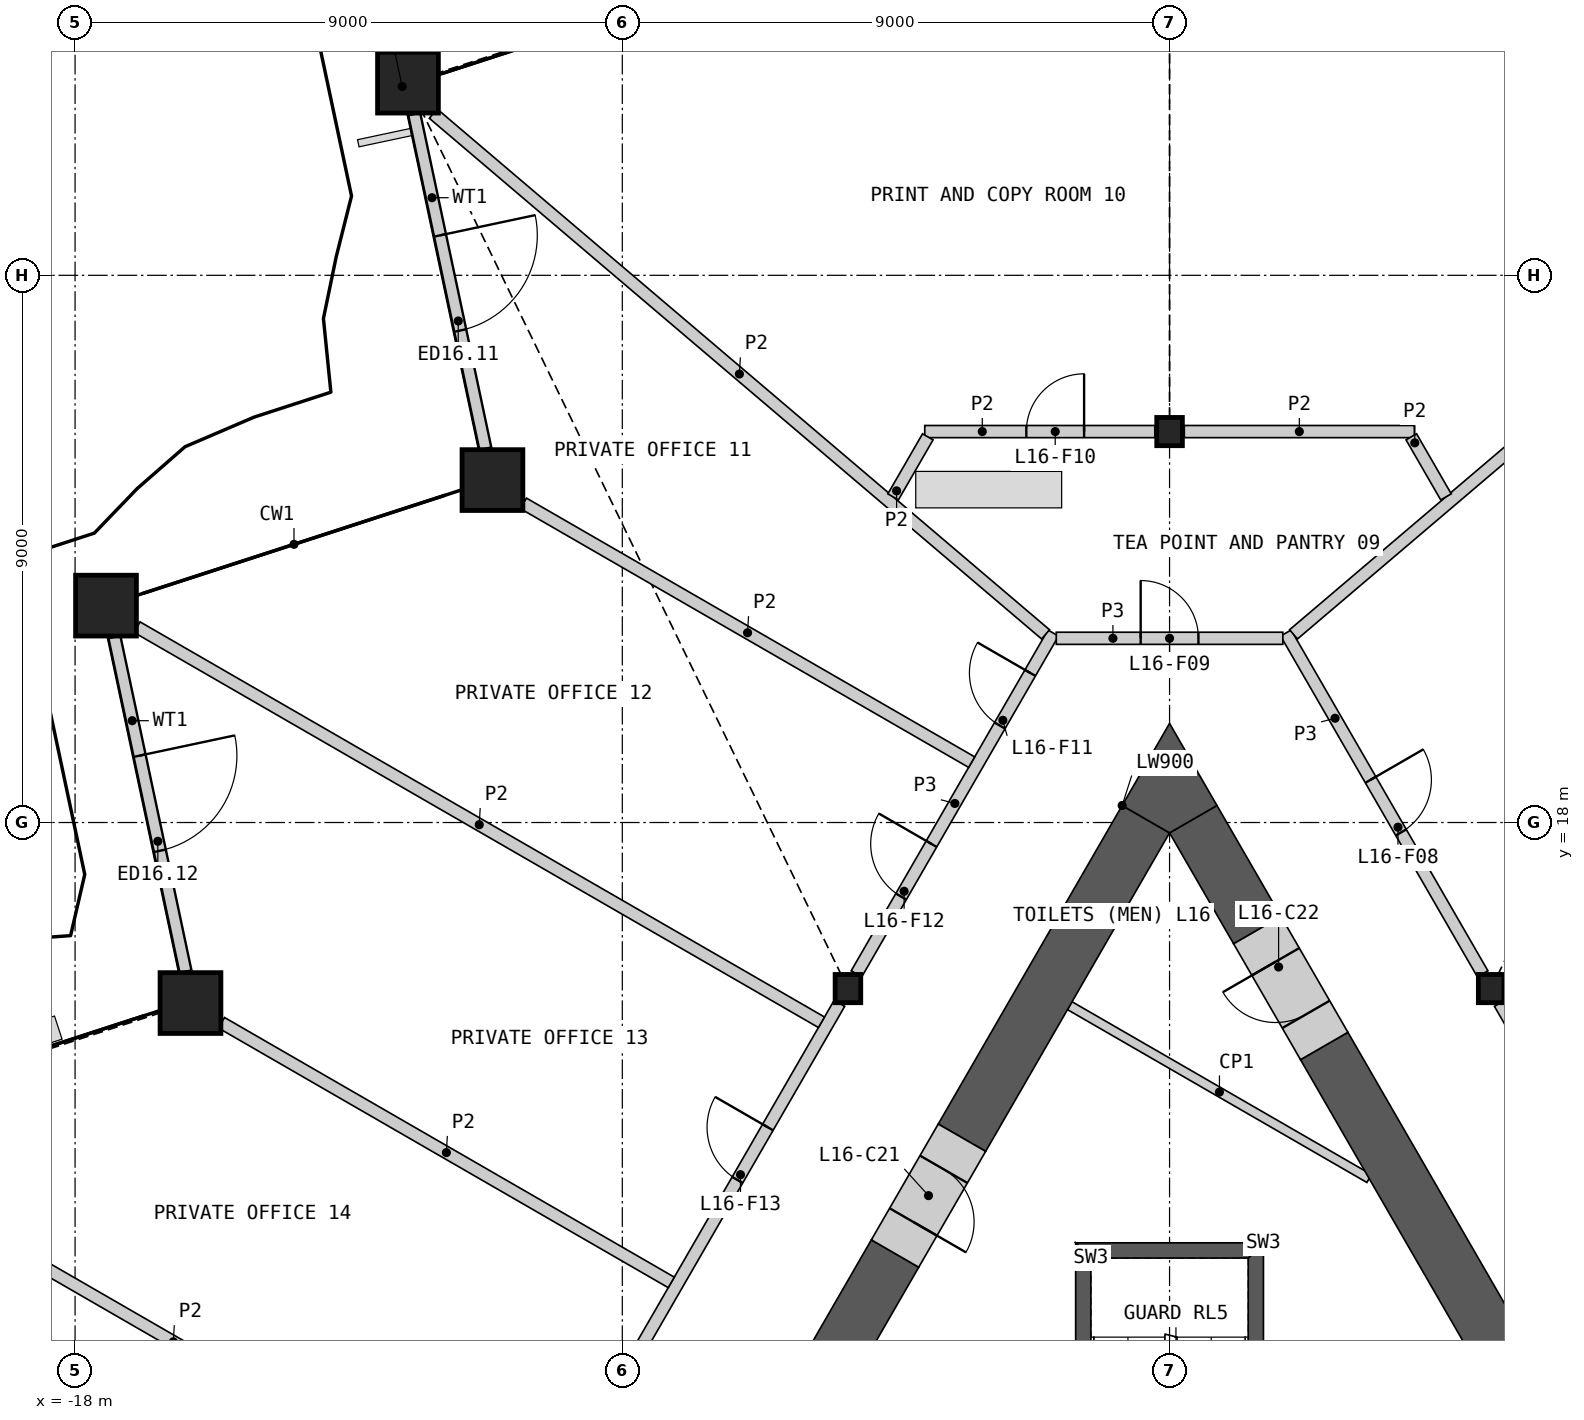
"""IFC4 building model, lengths in metres.
Left out: names, types, materials, properties, quantities, classifications, styles, units other than length and angle.
Written with IfcOpenShell. Run it as: python <this file> out.ifc"""

import sys

from ifc_helpers import new_model, si_unit, direction, frame, frame_2d, origin, origin_2d, place, context, subcontext, project, spatial, polyline, rectangle, hollow_rectangle, i_section, outline, extrude, element, fill, save


model = new_model("IFC4")
c1 = context("Model", 3, precision=1e-05, world=origin(), true_north=direction((0.0, 1.0)))
c2 = subcontext(c1, "Body", "Model", "MODEL_VIEW")
j1 = project(units=[si_unit("LENGTHUNIT", "METRE"), si_unit("PLANEANGLEUNIT", "RADIAN")], contexts=[c1])
p1 = place(None, origin())
s1 = spatial("IfcSite", under=j1, at=p1, CompositionType="ELEMENT")
p2 = place(p1, origin())
s2 = spatial("IfcBuilding", under=s1, at=p2, CompositionType="ELEMENT")
p3 = place(p2, frame((0.0, 0.0, 76.2)))
s3 = spatial("IfcBuildingStorey", under=s2, at=p3, CompositionType="ELEMENT", Elevation=76.2)
for number, where, z_axis, x_axis in (
    (1, (-12.525, 30.169, 0.0), (0.0, 0.0, 1.0), (1.0, 0.0, 0.0)),
    (2, (-11.136, 23.632, 0.0), (0.0, 0.0, 1.0), (1.0, 0.0, 0.0)),
    (3, (-17.491, 21.567, 0.0), (0.0, 0.0, 1.0), (1.0, 0.0, 0.0)),
    (4, (-16.102, 15.031, 0.0), (0.0, 0.0, 1.0), (1.0, 0.0, 0.0)),
):
    element("IfcColumn", number, at=place(p3, frame(where, z_axis=z_axis, x_axis=x_axis)), inside=s3, PredefinedType="COLUMN", context=c2, shape_type="SweptSolid", body=[
        extrude(hollow_rectangle(XDim=1.0, YDim=1.0, WallThickness=0.07, at=origin_2d()), origin(), (0.0, 0.0, 1.0), 4.2),
    ])
for number, where, z_axis, x_axis in (
    (5, (0.0, 24.43, 0.0), (0.0, 0.0, 1.0), (1.0, 0.0, 0.0)),
    (6, (-5.289, 15.269, 0.0), (0.0, 0.0, 1.0), (1.0, 0.0, 0.0)),
    (7, (5.289, 15.269, 0.0), (0.0, 0.0, 1.0), (1.0, 0.0, 0.0)),
):
    element("IfcColumn", number, at=place(p3, frame(where, z_axis=z_axis, x_axis=x_axis)), inside=s3, PredefinedType="COLUMN", context=c2, shape_type="SweptSolid", body=[
        extrude(i_section(OverallWidth=0.421, OverallDepth=0.465, WebThickness=0.045, FlangeThickness=0.072, at=origin_2d()), origin(), (0.0, 0.0, 1.0), 4.2),
    ])
p4 = place(p3, frame((-12.422, 29.652, 0.0), z_axis=(0.0, 0.0, 1.0), x_axis=(0.207901831982, -0.978149696242, 0.0)))
e8 = element("IfcWall", 8, at=p4, inside=s3, PredefinedType="SOLIDWALL", context=c2, shape_type="SweptSolid", body=[
    extrude(rectangle(XDim=5.626, YDim=0.2, at=frame_2d((2.813, 0.0))), origin(), (0.0, 0.0, 1.0), 3.189),
])
p5 = place(p4, frame((2.039, 0.0, 0.0)))
e9 = element("IfcOpeningElement", 9, at=p5, cuts=e8, PredefinedType="OPENING", context=c2, shape_type="SweptSolid", body=[
    extrude(rectangle(XDim=1.6, YDim=2.4, at=frame_2d((0.8, 1.2))), frame((0.0, 0.11, 0.0), z_axis=(0.0, -1.0, 0.0), x_axis=(1.0, 0.0, 0.0)), (0.0, 0.0, 1.0), 0.22),
])
p6 = place(p3, frame((-17.353, 21.051, 0.0), z_axis=(0.0, 0.0, 1.0), x_axis=(0.207901831982, -0.978149696242, 0.0)))
e10 = element("IfcWall", 10, at=p6, inside=s3, PredefinedType="SOLIDWALL", context=c2, shape_type="SweptSolid", body=[
    extrude(rectangle(XDim=5.626, YDim=0.2, at=frame_2d((2.813, 0.0))), origin(), (0.0, 0.0, 1.0), 3.189),
])
p7 = place(p6, frame((1.994, 0.0, 0.0)))
e11 = element("IfcOpeningElement", 11, at=p7, cuts=e10, PredefinedType="OPENING", context=c2, shape_type="SweptSolid", body=[
    extrude(rectangle(XDim=1.6, YDim=2.4, at=frame_2d((0.8, 1.2))), frame((0.0, 0.11, 0.0), z_axis=(0.0, -1.0, 0.0), x_axis=(1.0, 0.0, 0.0)), (0.0, 0.0, 1.0), 0.22),
])
p8 = place(p3, origin())
e12 = element("IfcWall", 12, at=p8, inside=s3, PredefinedType="SHEAR", context=c2, shape_type="SweptSolid", body=[
    extrude(outline(polyline([(1.544, 5.237), (1.544, 11.087), (1.294, 10.837), (1.294, 5.237), (1.544, 5.237)])), origin(), (0.0, 0.0, 1.0), 3.8),
])
p9 = place(p3, origin())
e13 = element("IfcWall", 13, at=p9, inside=s3, PredefinedType="SHEAR", context=c2, shape_type="SweptSolid", body=[
    extrude(outline(polyline([(1.544, 11.087), (-1.544, 11.087), (-1.294, 10.837), (1.294, 10.837), (1.544, 11.087)])), origin(), (0.0, 0.0, 1.0), 3.8),
])
p10 = place(p3, origin())
e14 = element("IfcWall", 14, at=p10, inside=s3, PredefinedType="SHEAR", context=c2, shape_type="SweptSolid", body=[
    extrude(outline(polyline([(-1.294, 10.837), (-1.544, 11.087), (-1.544, 5.237), (-1.294, 5.237), (-1.294, 10.837)])), origin(), (0.0, 0.0, 1.0), 3.8),
])
p11 = place(p3, frame((-1.641, 14.987, 0.0), z_axis=(0.0, 0.0, 1.0), x_axis=(0.866033267067, -0.499986380149, 0.0)))
e15 = element("IfcWall", 15, at=p11, inside=s3, PredefinedType="PARTITIONING", context=c2, shape_type="SweptSolid", body=[
    extrude(rectangle(XDim=5.685, YDim=0.15, at=frame_2d((2.843, 0.0))), origin(), (0.0, 0.0, 1.0), 3.8),
])
p12 = place(p3, frame((7.646, 5.486, 0.0), z_axis=(0.0, 0.0, 1.0), x_axis=(-0.499982660725, 0.866035414388, 0.0)))
e16 = element("IfcWall", 16, at=p12, inside=s3, PredefinedType="SHEAR", context=c2, shape_type="SweptSolid", body=[
    extrude(rectangle(XDim=10.206, YDim=0.9, at=frame_2d((5.103, 0.0))), origin(), (0.0, 0.0, 1.0), 3.8),
])
p13 = place(p3, frame((1.443, 16.23, 0.0), z_axis=(0.0, 0.0, 1.0), x_axis=(-0.500026652407, 0.866010015463, 0.0)))
e17 = element("IfcWall", 17, at=p13, inside=s3, PredefinedType="SHEAR", context=c2, shape_type="SweptSolid", body=[
    extrude(rectangle(XDim=2.107, YDim=0.9, at=frame_2d((1.054, 0.0))), origin(), (0.0, 0.0, 1.0), 3.8),
])
p14 = place(p3, frame((-4.514, 10.911, 0.0), z_axis=(0.0, 0.0, 1.0), x_axis=(-0.500006662879, -0.866021556935, 0.0)))
e18 = element("IfcWall", 18, at=p14, inside=s3, PredefinedType="SHEAR", context=c2, shape_type="SweptSolid", body=[
    extrude(rectangle(XDim=7.312, YDim=0.9, at=frame_2d((3.656, 0.0))), origin(), (0.0, 0.0, 1.0), 3.8),
])
p15 = place(p3, frame((-0.39, 18.055, 0.0), z_axis=(0.0, 0.0, 1.0), x_axis=(-0.500006596359, -0.866021595341, 0.0)))
e19 = element("IfcWall", 19, at=p15, inside=s3, PredefinedType="SHEAR", context=c2, shape_type="SweptSolid", body=[
    extrude(rectangle(XDim=6.049, YDim=0.9, at=frame_2d((3.025, 0.0))), origin(), (0.0, 0.0, 1.0), 3.8),
])
p16 = place(p3, origin())
e20 = element("IfcWall", 20, at=p16, inside=s3, PredefinedType="SHEAR", context=c2, shape_type="SweptSolid", body=[
    extrude(outline(polyline([(-0.779, 18.28), (0.0, 19.63), (0.779, 18.28), (0.0, 17.83), (-0.779, 18.28)])), origin(), (0.0, 0.0, 1.0), 3.8),
])
p17 = place(p3, frame((-3.414, 12.816, 0.0), z_axis=(0.0, 0.0, 1.0), x_axis=(-0.50002983664, -0.866008176907, 0.0)))
e21 = element("IfcWall", 21, at=p17, inside=s3, PredefinedType="SHEAR", context=c2, shape_type="SweptSolid", body=[
    extrude(rectangle(XDim=2.2, YDim=0.9, at=frame_2d((1.1, 0.0))), origin(), (0.0, 0.0, 1.0), 3.8),
])
p18 = place(p17, frame((0.6, 0.0, 0.0)))
e22 = element("IfcOpeningElement", 22, at=p18, cuts=e21, PredefinedType="OPENING", context=c2, shape_type="SweptSolid", body=[
    extrude(rectangle(XDim=1.0, YDim=2.1, at=frame_2d((0.5, 1.05))), frame((0.0, 0.46, 0.0), z_axis=(0.0, -1.0, 0.0), x_axis=(1.0, 0.0, 0.0)), (0.0, 0.0, 1.0), 0.92),
])
p19 = place(p3, frame((2.543, 14.325, 0.0), z_axis=(0.0, 0.0, 1.0), x_axis=(-0.50002983664, 0.866008176907, 0.0)))
e23 = element("IfcWall", 23, at=p19, inside=s3, PredefinedType="SHEAR", context=c2, shape_type="SweptSolid", body=[
    extrude(rectangle(XDim=2.2, YDim=0.9, at=frame_2d((1.1, 0.0))), origin(), (0.0, 0.0, 1.0), 3.8),
])
p20 = place(p19, frame((0.6, 0.0, 0.0)))
e24 = element("IfcOpeningElement", 24, at=p20, cuts=e23, PredefinedType="OPENING", context=c2, shape_type="SweptSolid", body=[
    extrude(rectangle(XDim=1.0, YDim=2.1, at=frame_2d((0.5, 1.05))), frame((0.0, 0.46, 0.0), z_axis=(0.0, -1.0, 0.0), x_axis=(1.0, 0.0, 0.0)), (0.0, 0.0, 1.0), 0.92),
])
p21 = place(p3, frame((5.429, 15.026, 0.0), z_axis=(0.0, 0.0, 1.0), x_axis=(0.50001002959, -0.86601961312, 0.0)))
e25 = element("IfcWall", 25, at=p21, inside=s3, PredefinedType="PARTITIONING", context=c2, shape_type="SweptSolid", body=[
    extrude(rectangle(XDim=10.019, YDim=0.2, at=frame_2d((5.009, 0.0))), origin(), (0.0, 0.0, 1.0), 3.8),
])
p22 = place(p21, frame((4.76, 0.0, 0.0)))
e26 = element("IfcOpeningElement", 26, at=p22, cuts=e25, PredefinedType="OPENING", context=c2, shape_type="SweptSolid", body=[
    extrude(rectangle(XDim=1.0, YDim=2.1, at=frame_2d((0.5, 1.05))), frame((0.0, 0.11, 0.0), z_axis=(0.0, -1.0, 0.0), x_axis=(1.0, 0.0, 0.0)), (0.0, 0.0, 1.0), 0.22),
])
p23 = place(p3, frame((-10.439, 6.35, 0.0), z_axis=(0.0, 0.0, 1.0), x_axis=(0.50001002959, 0.86601961312, 0.0)))
e27 = element("IfcWall", 27, at=p23, inside=s3, PredefinedType="PARTITIONING", context=c2, shape_type="SweptSolid", body=[
    extrude(rectangle(XDim=10.019, YDim=0.2, at=frame_2d((5.009, 0.0))), origin(), (0.0, 0.0, 1.0), 3.8),
])
p24 = place(p23, frame((6.664, 0.0, 0.0)))
e28 = element("IfcOpeningElement", 28, at=p24, cuts=e27, PredefinedType="OPENING", context=c2, shape_type="SweptSolid", body=[
    extrude(rectangle(XDim=1.0, YDim=2.1, at=frame_2d((0.5, 1.05))), frame((0.0, 0.11, 0.0), z_axis=(0.0, -1.0, 0.0), x_axis=(1.0, 0.0, 0.0)), (0.0, 0.0, 1.0), 0.22),
])
p25 = place(p23, frame((1.854, 0.0, 0.0)))
e29 = element("IfcOpeningElement", 29, at=p25, cuts=e27, PredefinedType="OPENING", context=c2, shape_type="SweptSolid", body=[
    extrude(rectangle(XDim=1.0, YDim=2.1, at=frame_2d((0.5, 1.05))), frame((0.0, 0.11, 0.0), z_axis=(0.0, -1.0, 0.0), x_axis=(1.0, 0.0, 0.0)), (0.0, 0.0, 1.0), 0.22),
])
p26 = place(p3, frame((1.913, 21.116, 0.0), z_axis=(0.0, 0.0, 1.0), x_axis=(0.500001069878, -0.866024786089, 0.0)))
e30 = element("IfcWall", 30, at=p26, inside=s3, PredefinedType="PARTITIONING", context=c2, shape_type="SweptSolid", body=[
    extrude(rectangle(XDim=6.473, YDim=0.2, at=frame_2d((3.236, 0.0))), origin(), (0.0, 0.0, 1.0), 3.8),
])
p27 = place(p26, frame((2.787, 0.0, 0.0)))
e31 = element("IfcOpeningElement", 31, at=p27, cuts=e30, PredefinedType="OPENING", context=c2, shape_type="SweptSolid", body=[
    extrude(rectangle(XDim=1.0, YDim=2.1, at=frame_2d((0.5, 1.05))), frame((0.0, 0.11, 0.0), z_axis=(0.0, -1.0, 0.0), x_axis=(1.0, 0.0, 0.0)), (0.0, 0.0, 1.0), 0.22),
])
p28 = place(p3, frame((-5.149, 15.511, 0.0), z_axis=(0.0, 0.0, 1.0), x_axis=(0.500001069878, 0.866024786089, 0.0)))
e32 = element("IfcWall", 32, at=p28, inside=s3, PredefinedType="PARTITIONING", context=c2, shape_type="SweptSolid", body=[
    extrude(rectangle(XDim=6.473, YDim=0.2, at=frame_2d((3.236, 0.0))), origin(), (0.0, 0.0, 1.0), 3.8),
])
p29 = place(p28, frame((4.715, 0.0, 0.0)))
e33 = element("IfcOpeningElement", 33, at=p29, cuts=e32, PredefinedType="OPENING", context=c2, shape_type="SweptSolid", body=[
    extrude(rectangle(XDim=1.0, YDim=2.1, at=frame_2d((0.5, 1.05))), frame((0.0, 0.11, 0.0), z_axis=(0.0, -1.0, 0.0), x_axis=(1.0, 0.0, 0.0)), (0.0, 0.0, 1.0), 0.22),
])
p30 = place(p28, frame((1.468, 0.0, 0.0)))
e34 = element("IfcOpeningElement", 34, at=p30, cuts=e32, PredefinedType="OPENING", context=c2, shape_type="SweptSolid", body=[
    extrude(rectangle(XDim=1.0, YDim=2.1, at=frame_2d((0.5, 1.05))), frame((0.0, 0.11, 0.0), z_axis=(0.0, -1.0, 0.0), x_axis=(1.0, 0.0, 0.0)), (0.0, 0.0, 1.0), 0.22),
])
p31 = place(p3, frame((-1.863, 21.03, 0.0), z_axis=(0.0, 0.0, 1.0), x_axis=(1.0, 0.0, 0.0)))
e35 = element("IfcWall", 35, at=p31, inside=s3, PredefinedType="PARTITIONING", context=c2, shape_type="SweptSolid", body=[
    extrude(rectangle(XDim=3.726, YDim=0.2, at=frame_2d((1.863, 0.0))), origin(), (0.0, 0.0, 1.0), 3.8),
])
p32 = place(p31, frame((1.388, 0.0, 0.0)))
e36 = element("IfcOpeningElement", 36, at=p32, cuts=e35, PredefinedType="OPENING", context=c2, shape_type="SweptSolid", body=[
    extrude(rectangle(XDim=0.95, YDim=2.1, at=frame_2d((0.475, 1.05))), frame((0.0, 0.11, 0.0), z_axis=(0.0, -1.0, 0.0), x_axis=(1.0, 0.0, 0.0)), (0.0, 0.0, 1.0), 0.22),
])
for number, where, z_axis, x_axis in (
    (37, (2.039, 21.095, 0.0), (0.0, 0.0, 1.0), (0.762, 0.648, 0.0)),
    (38, (-12.109, 29.659, 0.0), (0.0, 0.0, 1.0), (0.762, -0.648, 0.0)),
):
    element("IfcWall", number, at=place(p3, frame(where, z_axis=z_axis, x_axis=x_axis)), inside=s3, PredefinedType="PARTITIONING", context=c2, shape_type="SweptSolid", body=[
        extrude(rectangle(XDim=13.219, YDim=0.2, at=frame_2d((6.609, 0.0))), origin(), (0.0, 0.0, 1.0), 2.885),
    ])
p33 = place(p3, frame((-16.981, 21.213, 0.0), z_axis=(0.0, 0.0, 1.0), x_axis=(0.866032633092, -0.499987478263, 0.0)))
e39 = element("IfcWall", 39, at=p33, inside=s3, PredefinedType="PARTITIONING", context=c2, shape_type="SweptSolid", body=[
    extrude(rectangle(XDim=12.998, YDim=0.2, at=frame_2d((6.499, 0.0))), origin(), (0.0, 0.0, 1.0), 2.885),
])
p34 = place(p3, frame((-21.947, 12.671, 0.0), z_axis=(0.0, 0.0, 1.0), x_axis=(0.866026729935, -0.499997703033, 0.0)))
e40 = element("IfcWall", 40, at=p34, inside=s3, PredefinedType="PARTITIONING", context=c2, shape_type="SweptSolid", body=[
    extrude(rectangle(XDim=12.848, YDim=0.2, at=frame_2d((6.424, 0.0))), origin(), (0.0, 0.0, 1.0), 2.885),
])
p35 = place(p3, frame((-15.592, 14.707, 0.0), z_axis=(0.0, 0.0, 1.0), x_axis=(0.866032315796, -0.499988027854, 0.0)))
e41 = element("IfcWall", 41, at=p35, inside=s3, PredefinedType="PARTITIONING", context=c2, shape_type="SweptSolid", body=[
    extrude(rectangle(XDim=8.541, YDim=0.2, at=frame_2d((4.271, 0.0))), origin(), (0.0, 0.0, 1.0), 2.885),
])
p36 = place(p3, frame((-10.626, 23.249, 0.0), z_axis=(0.0, 0.0, 1.0), x_axis=(0.866037037334, -0.49997984956, 0.0)))
e42 = element("IfcWall", 42, at=p36, inside=s3, PredefinedType="PARTITIONING", context=c2, shape_type="SweptSolid", body=[
    extrude(rectangle(XDim=8.511, YDim=0.2, at=frame_2d((4.256, 0.0))), origin(), (0.0, 0.0, 1.0), 2.885),
])
p37 = place(p3, frame((-4.026, 24.43, 0.0), z_axis=(0.0, 0.0, 1.0), x_axis=(1.0, 0.0, 0.0)))
e43 = element("IfcWall", 43, at=p37, inside=s3, PredefinedType="PARTITIONING", context=c2, shape_type="SweptSolid", body=[
    extrude(rectangle(XDim=3.784, YDim=0.2, at=frame_2d((1.892, 0.0))), origin(), (0.0, 0.0, 1.0), 2.885),
])
p38 = place(p37, frame((1.67, 0.0, 0.0)))
e44 = element("IfcOpeningElement", 44, at=p38, cuts=e43, PredefinedType="OPENING", context=c2, shape_type="SweptSolid", body=[
    extrude(rectangle(XDim=0.95, YDim=2.1, at=frame_2d((0.475, 1.05))), frame((0.0, 0.11, 0.0), z_axis=(0.0, -1.0, 0.0), x_axis=(1.0, 0.0, 0.0)), (0.0, 0.0, 1.0), 0.22),
])
p39 = place(p3, frame((0.242, 24.43, 0.0), z_axis=(0.0, 0.0, 1.0), x_axis=(1.0, 0.0, 0.0)))
e45 = element("IfcWall", 45, at=p39, inside=s3, PredefinedType="PARTITIONING", context=c2, shape_type="SweptSolid", body=[
    extrude(rectangle(XDim=3.784, YDim=0.2, at=frame_2d((1.892, 0.0))), origin(), (0.0, 0.0, 1.0), 2.885),
])
for number, where, z_axis, x_axis in (
    (46, (3.976, 24.343, 0.0), (0.0, 0.0, 1.0), (0.5, -0.866, 0.0)),
    (47, (-4.546, 23.356, 0.0), (0.0, 0.0, 1.0), (0.5, 0.866, 0.0)),
):
    element("IfcWall", number, at=place(p3, frame(where, z_axis=z_axis, x_axis=x_axis)), inside=s3, PredefinedType="PARTITIONING", context=c2, shape_type="SweptSolid", body=[
        extrude(rectangle(XDim=1.14, YDim=0.2, at=frame_2d((0.57, 0.0))), origin(), (0.0, 0.0, 1.0), 2.885),
    ])
p40 = place(p5, origin())
e48 = element("IfcDoor", 48, at=p40, inside=s3, OperationType="DOUBLE_DOOR_SINGLE_SWING", PredefinedType="DOOR", context=c2, shape_type="SweptSolid", body=[
    extrude(rectangle(XDim=1.6, YDim=2.4, at=frame_2d((0.8, 1.2))), frame((0.0, 0.025, 0.0), z_axis=(0.0, -1.0, 0.0), x_axis=(1.0, 0.0, 0.0)), (0.0, 0.0, 1.0), 0.05),
])
fill(e9, e48)
p41 = place(p7, origin())
e49 = element("IfcDoor", 49, at=p41, inside=s3, OperationType="DOUBLE_DOOR_SINGLE_SWING", PredefinedType="DOOR", context=c2, shape_type="SweptSolid", body=[
    extrude(rectangle(XDim=1.6, YDim=2.4, at=frame_2d((0.8, 1.2))), frame((0.0, 0.025, 0.0), z_axis=(0.0, -1.0, 0.0), x_axis=(1.0, 0.0, 0.0)), (0.0, 0.0, 1.0), 0.05),
])
fill(e11, e49)
p42 = place(p18, origin())
e50 = element("IfcDoor", 50, at=p42, inside=s3, OperationType="SINGLE_SWING_RIGHT", PredefinedType="DOOR", context=c2, shape_type="SweptSolid", body=[
    extrude(rectangle(XDim=1.0, YDim=2.1, at=frame_2d((0.5, 1.05))), frame((0.0, 0.205, 0.0), z_axis=(0.0, -1.0, 0.0), x_axis=(1.0, 0.0, 0.0)), (0.0, 0.0, 1.0), 0.05),
])
fill(e22, e50)
p43 = place(p20, origin())
e51 = element("IfcDoor", 51, at=p43, inside=s3, OperationType="SINGLE_SWING_RIGHT", PredefinedType="DOOR", context=c2, shape_type="SweptSolid", body=[
    extrude(rectangle(XDim=1.0, YDim=2.1, at=frame_2d((0.5, 1.05))), frame((0.0, 0.205, 0.0), z_axis=(0.0, -1.0, 0.0), x_axis=(1.0, 0.0, 0.0)), (0.0, 0.0, 1.0), 0.05),
])
fill(e24, e51)
p44 = place(p27, origin())
e52 = element("IfcDoor", 52, at=p44, inside=s3, OperationType="SINGLE_SWING_LEFT", PredefinedType="DOOR", context=c2, shape_type="SweptSolid", body=[
    extrude(rectangle(XDim=1.0, YDim=2.1, at=frame_2d((0.5, 1.05))), frame((0.0, 0.025, 0.0), z_axis=(0.0, -1.0, 0.0), x_axis=(1.0, 0.0, 0.0)), (0.0, 0.0, 1.0), 0.05),
])
fill(e31, e52)
p45 = place(p32, origin())
e53 = element("IfcDoor", 53, at=p45, inside=s3, OperationType="SINGLE_SWING_LEFT", PredefinedType="DOOR", context=c2, shape_type="SweptSolid", body=[
    extrude(rectangle(XDim=0.95, YDim=2.1, at=frame_2d((0.475, 1.05))), frame((0.0, 0.025, 0.0), z_axis=(0.0, -1.0, 0.0), x_axis=(1.0, 0.0, 0.0)), (0.0, 0.0, 1.0), 0.05),
])
fill(e36, e53)
p46 = place(p38, origin())
e54 = element("IfcDoor", 54, at=p46, inside=s3, OperationType="SINGLE_SWING_RIGHT", PredefinedType="DOOR", context=c2, shape_type="SweptSolid", body=[
    extrude(rectangle(XDim=0.95, YDim=2.1, at=frame_2d((0.475, 1.05))), frame((0.0, 0.025, 0.0), z_axis=(0.0, -1.0, 0.0), x_axis=(1.0, 0.0, 0.0)), (0.0, 0.0, 1.0), 0.05),
])
fill(e44, e54)
p47 = place(p29, origin())
e55 = element("IfcDoor", 55, at=p47, inside=s3, OperationType="SINGLE_SWING_RIGHT", PredefinedType="DOOR", context=c2, shape_type="SweptSolid", body=[
    extrude(rectangle(XDim=1.0, YDim=2.1, at=frame_2d((0.5, 1.05))), frame((0.0, 0.025, 0.0), z_axis=(0.0, -1.0, 0.0), x_axis=(1.0, 0.0, 0.0)), (0.0, 0.0, 1.0), 0.05),
])
fill(e33, e55)
p48 = place(p30, origin())
e56 = element("IfcDoor", 56, at=p48, inside=s3, OperationType="SINGLE_SWING_RIGHT", PredefinedType="DOOR", context=c2, shape_type="SweptSolid", body=[
    extrude(rectangle(XDim=1.0, YDim=2.1, at=frame_2d((0.5, 1.05))), frame((0.0, 0.025, 0.0), z_axis=(0.0, -1.0, 0.0), x_axis=(1.0, 0.0, 0.0)), (0.0, 0.0, 1.0), 0.05),
])
fill(e34, e56)
p49 = place(p24, origin())
e57 = element("IfcDoor", 57, at=p49, inside=s3, OperationType="SINGLE_SWING_RIGHT", PredefinedType="DOOR", context=c2, shape_type="SweptSolid", body=[
    extrude(rectangle(XDim=1.0, YDim=2.1, at=frame_2d((0.5, 1.05))), frame((0.0, 0.025, 0.0), z_axis=(0.0, -1.0, 0.0), x_axis=(1.0, 0.0, 0.0)), (0.0, 0.0, 1.0), 0.05),
])
fill(e28, e57)
save(model, sys.argv[1])
